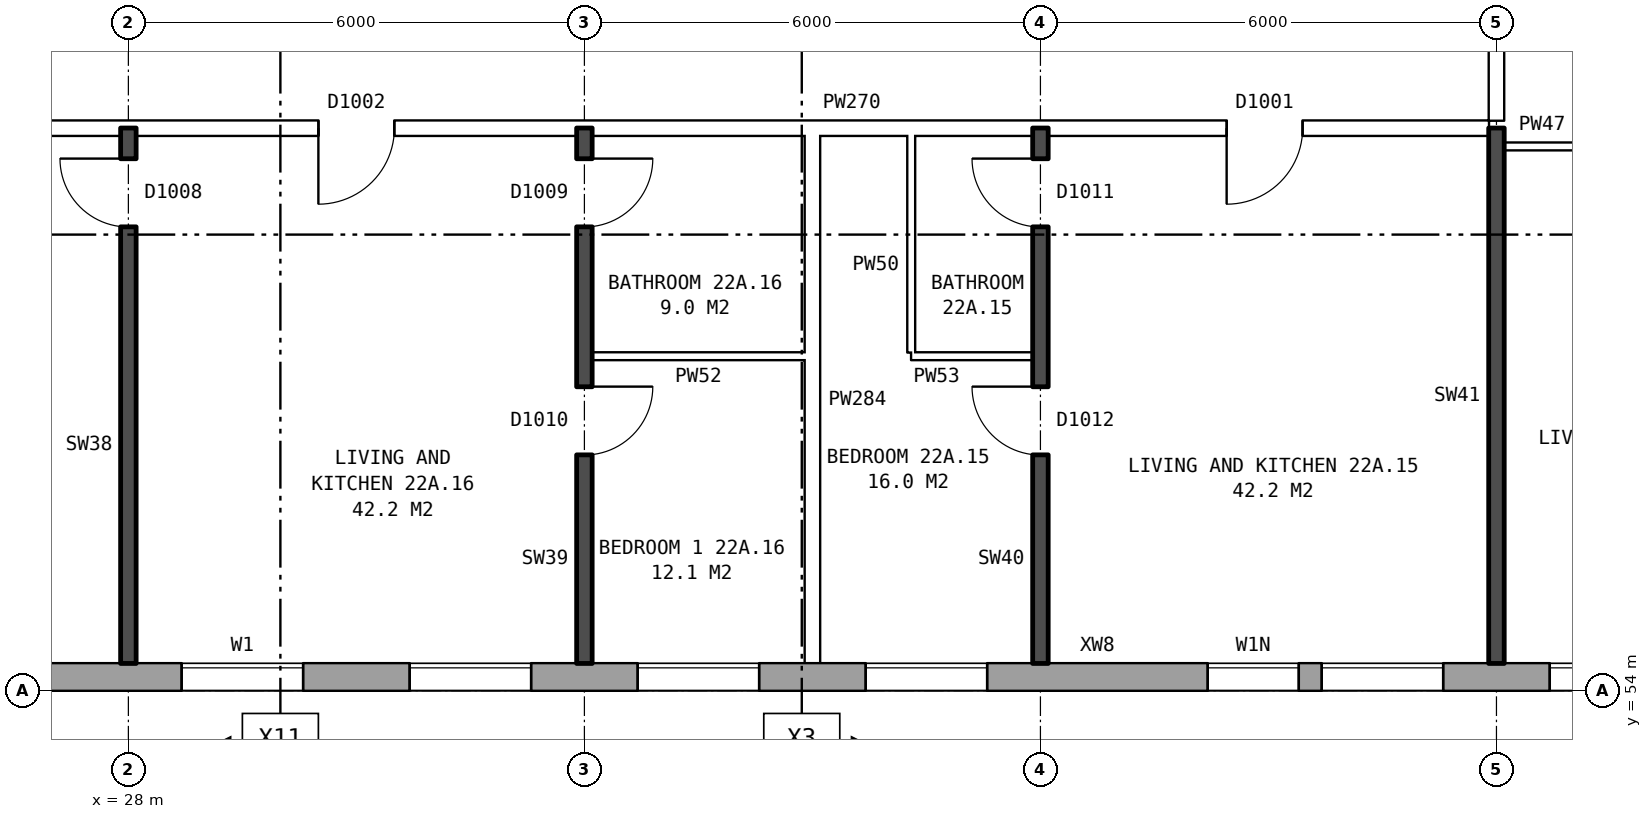
"""IFC4 building model, lengths in metres.
Left out: names, types, materials, properties, quantities, classifications, styles, units other than length and angle.
Written with IfcOpenShell. Run it as: python <this file> out.ifc"""

import sys

from ifc_helpers import new_model, si_unit, direction, frame, frame_2d, origin, place, context, subcontext, project, spatial, rectangle, extrude, element, fill, save


model = new_model("IFC4")
c1 = context("Model", 3, precision=1e-05, world=origin(), true_north=direction((0.0, 1.0)))
c2 = subcontext(c1, "Body", "Model", "MODEL_VIEW")
j1 = project(units=[si_unit("LENGTHUNIT", "METRE"), si_unit("PLANEANGLEUNIT", "RADIAN")], contexts=[c1])
p1 = place(None, origin())
s1 = spatial("IfcSite", under=j1, at=p1, CompositionType="ELEMENT")
p2 = place(p1, origin())
s2 = spatial("IfcBuilding", under=s1, at=p2, CompositionType="ELEMENT")
p3 = place(p2, frame((0.0, 0.0, 80.9)))
s3 = spatial("IfcBuildingStorey", under=s2, at=p3, CompositionType="ELEMENT", Elevation=80.9)
p4 = place(p3, frame((26.325, 54.18, 0.0), z_axis=(0.0, 0.0, 1.0), x_axis=(1.0, 0.0, 0.0)))
e1 = element("IfcWall", 1, at=p4, inside=s3, PredefinedType="STANDARD", context=c2, shape_type="SweptSolid", body=[
    extrude(rectangle(XDim=46.601, YDim=0.36, at=frame_2d((23.3, 0.0))), origin(), (0.0, 0.0, 1.0), 2.85),
])
p5 = place(p4, frame((2.375, 0.0, 0.8)))
e2 = element("IfcOpeningElement", 2, at=p5, cuts=e1, PredefinedType="OPENING", context=c2, shape_type="SweptSolid", body=[
    extrude(rectangle(XDim=1.6, YDim=1.8, at=frame_2d((0.8, 0.9))), frame((0.0, 0.19, 0.0), z_axis=(0.0, -1.0, 0.0), x_axis=(1.0, 0.0, 0.0)), (0.0, 0.0, 1.0), 0.38),
])
p6 = place(p4, frame((5.375, 0.0, 0.8)))
e3 = element("IfcOpeningElement", 3, at=p6, cuts=e1, PredefinedType="OPENING", context=c2, shape_type="SweptSolid", body=[
    extrude(rectangle(XDim=1.6, YDim=1.8, at=frame_2d((0.8, 0.9))), frame((0.0, 0.19, 0.0), z_axis=(0.0, -1.0, 0.0), x_axis=(1.0, 0.0, 0.0)), (0.0, 0.0, 1.0), 0.38),
])
p7 = place(p4, frame((8.375, 0.0, 0.8)))
e4 = element("IfcOpeningElement", 4, at=p7, cuts=e1, PredefinedType="OPENING", context=c2, shape_type="SweptSolid", body=[
    extrude(rectangle(XDim=1.6, YDim=1.8, at=frame_2d((0.8, 0.9))), frame((0.0, 0.19, 0.0), z_axis=(0.0, -1.0, 0.0), x_axis=(1.0, 0.0, 0.0)), (0.0, 0.0, 1.0), 0.38),
])
p8 = place(p4, frame((11.375, 0.0, 0.8)))
e5 = element("IfcOpeningElement", 5, at=p8, cuts=e1, PredefinedType="OPENING", context=c2, shape_type="SweptSolid", body=[
    extrude(rectangle(XDim=1.6, YDim=1.8, at=frame_2d((0.8, 0.9))), frame((0.0, 0.19, 0.0), z_axis=(0.0, -1.0, 0.0), x_axis=(1.0, 0.0, 0.0)), (0.0, 0.0, 1.0), 0.38),
])
p9 = place(p4, frame((15.875, 0.0, 0.8)))
e6 = element("IfcOpeningElement", 6, at=p9, cuts=e1, PredefinedType="OPENING", context=c2, shape_type="SweptSolid", body=[
    extrude(rectangle(XDim=1.2, YDim=1.2, at=frame_2d((0.6, 0.6))), frame((0.0, 0.19, 0.0), z_axis=(0.0, -1.0, 0.0), x_axis=(1.0, 0.0, 0.0)), (0.0, 0.0, 1.0), 0.38),
])
p10 = place(p4, frame((17.375, 0.0, 0.8)))
e7 = element("IfcOpeningElement", 7, at=p10, cuts=e1, PredefinedType="OPENING", context=c2, shape_type="SweptSolid", body=[
    extrude(rectangle(XDim=1.6, YDim=1.8, at=frame_2d((0.8, 0.9))), frame((0.0, 0.19, 0.0), z_axis=(0.0, -1.0, 0.0), x_axis=(1.0, 0.0, 0.0)), (0.0, 0.0, 1.0), 0.38),
])
p11 = place(p4, frame((20.375, 0.0, 0.8)))
e8 = element("IfcOpeningElement", 8, at=p11, cuts=e1, PredefinedType="OPENING", context=c2, shape_type="SweptSolid", body=[
    extrude(rectangle(XDim=1.6, YDim=1.8, at=frame_2d((0.8, 0.9))), frame((0.0, 0.19, 0.0), z_axis=(0.0, -1.0, 0.0), x_axis=(1.0, 0.0, 0.0)), (0.0, 0.0, 1.0), 0.38),
])
p12 = place(p4, frame((23.375, 0.0, 0.8)))
e9 = element("IfcOpeningElement", 9, at=p12, cuts=e1, PredefinedType="OPENING", context=c2, shape_type="SweptSolid", body=[
    extrude(rectangle(XDim=1.6, YDim=1.8, at=frame_2d((0.8, 0.9))), frame((0.0, 0.19, 0.0), z_axis=(0.0, -1.0, 0.0), x_axis=(1.0, 0.0, 0.0)), (0.0, 0.0, 1.0), 0.38),
])
p13 = place(p4, frame((26.375, 0.0, 0.8)))
e10 = element("IfcOpeningElement", 10, at=p13, cuts=e1, PredefinedType="OPENING", context=c2, shape_type="SweptSolid", body=[
    extrude(rectangle(XDim=1.6, YDim=1.8, at=frame_2d((0.8, 0.9))), frame((0.0, 0.19, 0.0), z_axis=(0.0, -1.0, 0.0), x_axis=(1.0, 0.0, 0.0)), (0.0, 0.0, 1.0), 0.38),
])
p14 = place(p4, frame((28.825, 0.0, 0.8)))
e11 = element("IfcOpeningElement", 11, at=p14, cuts=e1, PredefinedType="OPENING", context=c2, shape_type="SweptSolid", body=[
    extrude(rectangle(XDim=1.2, YDim=1.8, at=frame_2d((0.6, 0.9))), frame((0.0, 0.19, 0.0), z_axis=(0.0, -1.0, 0.0), x_axis=(1.0, 0.0, 0.0)), (0.0, 0.0, 1.0), 0.38),
])
p15 = place(p4, frame((32.375, 0.0, 1.7)))
e12 = element("IfcOpeningElement", 12, at=p15, cuts=e1, PredefinedType="OPENING", context=c2, shape_type="SweptSolid", body=[
    extrude(rectangle(XDim=0.8, YDim=0.9, at=frame_2d((0.4, 0.45))), frame((0.0, 0.19, 0.0), z_axis=(0.0, -1.0, 0.0), x_axis=(1.0, 0.0, 0.0)), (0.0, 0.0, 1.0), 0.38),
])
p16 = place(p4, frame((35.375, 0.0, 0.8)))
e13 = element("IfcOpeningElement", 13, at=p16, cuts=e1, PredefinedType="OPENING", context=c2, shape_type="SweptSolid", body=[
    extrude(rectangle(XDim=1.6, YDim=1.8, at=frame_2d((0.8, 0.9))), frame((0.0, 0.19, 0.0), z_axis=(0.0, -1.0, 0.0), x_axis=(1.0, 0.0, 0.0)), (0.0, 0.0, 1.0), 0.38),
])
p17 = place(p4, frame((38.375, 0.0, 0.8)))
e14 = element("IfcOpeningElement", 14, at=p17, cuts=e1, PredefinedType="OPENING", context=c2, shape_type="SweptSolid", body=[
    extrude(rectangle(XDim=1.6, YDim=1.8, at=frame_2d((0.8, 0.9))), frame((0.0, 0.19, 0.0), z_axis=(0.0, -1.0, 0.0), x_axis=(1.0, 0.0, 0.0)), (0.0, 0.0, 1.0), 0.38),
])
p18 = place(p4, frame((41.375, 0.0, 0.8)))
e15 = element("IfcOpeningElement", 15, at=p18, cuts=e1, PredefinedType="OPENING", context=c2, shape_type="SweptSolid", body=[
    extrude(rectangle(XDim=1.6, YDim=1.8, at=frame_2d((0.8, 0.9))), frame((0.0, 0.19, 0.0), z_axis=(0.0, -1.0, 0.0), x_axis=(1.0, 0.0, 0.0)), (0.0, 0.0, 1.0), 0.38),
])
p19 = place(p4, frame((44.375, 0.0, 0.8)))
e16 = element("IfcOpeningElement", 16, at=p19, cuts=e1, PredefinedType="OPENING", context=c2, shape_type="SweptSolid", body=[
    extrude(rectangle(XDim=1.6, YDim=1.8, at=frame_2d((0.8, 0.9))), frame((0.0, 0.19, 0.0), z_axis=(0.0, -1.0, 0.0), x_axis=(1.0, 0.0, 0.0)), (0.0, 0.0, 1.0), 0.38),
])
p20 = place(p4, frame((30.325, 0.0, 0.8)))
e17 = element("IfcOpeningElement", 17, at=p20, cuts=e1, PredefinedType="OPENING", context=c2, shape_type="SweptSolid", body=[
    extrude(rectangle(XDim=0.6, YDim=0.9, at=frame_2d((0.3, 0.45))), frame((0.0, 0.19, 0.0), z_axis=(0.0, -1.0, 0.0), x_axis=(1.0, 0.0, 0.0)), (0.0, 0.0, 1.0), 0.38),
])
p21 = place(p4, frame((33.475, 0.0, 0.8)))
e18 = element("IfcOpeningElement", 18, at=p21, cuts=e1, PredefinedType="OPENING", context=c2, shape_type="SweptSolid", body=[
    extrude(rectangle(XDim=1.0, YDim=1.8, at=frame_2d((0.5, 0.9))), frame((0.0, 0.19, 0.0), z_axis=(0.0, -1.0, 0.0), x_axis=(1.0, 0.0, 0.0)), (0.0, 0.0, 1.0), 0.38),
])
p22 = place(p3, frame((34.1, 58.4, 0.0), z_axis=(0.0, 0.0, 1.0), x_axis=(1.0, 0.0, 0.0)))
e19 = element("IfcWall", 19, at=p22, inside=s3, PredefinedType="PARTITIONING", context=c2, shape_type="SweptSolid", body=[
    extrude(rectangle(XDim=2.8, YDim=0.1, at=frame_2d((1.4, 0.0))), origin(), (0.0, 0.0, 1.0), 2.85),
])
p23 = place(p3, frame((38.3, 58.4, 0.0), z_axis=(0.0, 0.0, 1.0), x_axis=(1.0, 0.0, 0.0)))
e20 = element("IfcWall", 20, at=p23, inside=s3, PredefinedType="PARTITIONING", context=c2, shape_type="SweptSolid", body=[
    extrude(rectangle(XDim=1.6, YDim=0.1, at=frame_2d((0.8, 0.0))), origin(), (0.0, 0.0, 1.0), 2.85),
])
p24 = place(p3, frame((46.1, 61.16, 0.0), z_axis=(0.0, 0.0, 1.0), x_axis=(1.0, 0.0, 0.0)))
e21 = element("IfcWall", 21, at=p24, inside=s3, PredefinedType="PARTITIONING", context=c2, shape_type="SweptSolid", body=[
    extrude(rectangle(XDim=2.9, YDim=0.1, at=frame_2d((1.45, 0.0))), origin(), (0.0, 0.0, 1.0), 2.85),
])
p25 = place(p24, frame((1.0, 0.0, 0.0)))
e22 = element("IfcOpeningElement", 22, at=p25, cuts=e21, PredefinedType="OPENING", context=c2, shape_type="SweptSolid", body=[
    extrude(rectangle(XDim=0.9, YDim=2.1, at=frame_2d((0.45, 1.05))), frame((0.0, 0.06, 0.0), z_axis=(0.0, -1.0, 0.0), x_axis=(1.0, 0.0, 0.0)), (0.0, 0.0, 1.0), 0.12),
])
p26 = place(p3, frame((23.61, 61.4, 0.0), z_axis=(0.0, 0.0, 1.0), x_axis=(1.0, 0.0, 0.0)))
e23 = element("IfcWall", 23, at=p26, inside=s3, PredefinedType="PARTITIONING", context=c2, shape_type="SweptSolid", body=[
    extrude(rectangle(XDim=22.29, YDim=0.2, at=frame_2d((11.145, 0.0))), origin(), (0.0, 0.0, 1.0), 2.85),
])
p27 = place(p26, frame((18.84, 0.0, 0.0)))
e24 = element("IfcOpeningElement", 24, at=p27, cuts=e23, PredefinedType="OPENING", context=c2, shape_type="SweptSolid", body=[
    extrude(rectangle(XDim=1.0, YDim=2.1, at=frame_2d((0.5, 1.05))), frame((0.0, 0.11, 0.0), z_axis=(0.0, -1.0, 0.0), x_axis=(1.0, 0.0, 0.0)), (0.0, 0.0, 1.0), 0.22),
])
p28 = place(p26, frame((6.89, 0.0, 0.0)))
e25 = element("IfcOpeningElement", 25, at=p28, cuts=e23, PredefinedType="OPENING", context=c2, shape_type="SweptSolid", body=[
    extrude(rectangle(XDim=1.0, YDim=2.1, at=frame_2d((0.5, 1.05))), frame((0.0, 0.11, 0.0), z_axis=(0.0, -1.0, 0.0), x_axis=(1.0, 0.0, 0.0)), (0.0, 0.0, 1.0), 0.22),
])
p29 = place(p3, frame((28.0, 54.36, 0.0), z_axis=(0.0, 0.0, 1.0), x_axis=(0.0, 1.0, 0.0)))
e26 = element("IfcWall", 26, at=p29, inside=s3, PredefinedType="SOLIDWALL", context=c2, shape_type="SweptSolid", body=[
    extrude(rectangle(XDim=7.04, YDim=0.2, at=frame_2d((3.52, 0.0))), origin(), (0.0, 0.0, 1.0), 2.85),
])
p30 = place(p29, frame((5.74, 0.0, 0.0)))
e27 = element("IfcOpeningElement", 27, at=p30, cuts=e26, PredefinedType="OPENING", context=c2, shape_type="SweptSolid", body=[
    extrude(rectangle(XDim=0.9, YDim=2.1, at=frame_2d((0.45, 1.05))), frame((0.0, 0.11, 0.0), z_axis=(0.0, -1.0, 0.0), x_axis=(1.0, 0.0, 0.0)), (0.0, 0.0, 1.0), 0.22),
])
p31 = place(p3, frame((34.0, 54.36, 0.0), z_axis=(0.0, 0.0, 1.0), x_axis=(0.0, 1.0, 0.0)))
e28 = element("IfcWall", 28, at=p31, inside=s3, PredefinedType="SOLIDWALL", context=c2, shape_type="SweptSolid", body=[
    extrude(rectangle(XDim=7.04, YDim=0.2, at=frame_2d((3.52, 0.0))), origin(), (0.0, 0.0, 1.0), 2.85),
])
p32 = place(p31, frame((2.74, 0.0, 0.0)))
e29 = element("IfcOpeningElement", 29, at=p32, cuts=e28, PredefinedType="OPENING", context=c2, shape_type="SweptSolid", body=[
    extrude(rectangle(XDim=0.9, YDim=2.1, at=frame_2d((0.45, 1.05))), frame((0.0, 0.11, 0.0), z_axis=(0.0, -1.0, 0.0), x_axis=(1.0, 0.0, 0.0)), (0.0, 0.0, 1.0), 0.22),
])
p33 = place(p31, frame((5.74, 0.0, 0.0)))
e30 = element("IfcOpeningElement", 30, at=p33, cuts=e28, PredefinedType="OPENING", context=c2, shape_type="SweptSolid", body=[
    extrude(rectangle(XDim=0.9, YDim=2.1, at=frame_2d((0.45, 1.05))), frame((0.0, 0.11, 0.0), z_axis=(0.0, -1.0, 0.0), x_axis=(1.0, 0.0, 0.0)), (0.0, 0.0, 1.0), 0.22),
])
p34 = place(p3, frame((37.0, 54.36, 0.0), z_axis=(0.0, 0.0, 1.0), x_axis=(0.0, 1.0, 0.0)))
e31 = element("IfcWall", 31, at=p34, inside=s3, PredefinedType="PARTITIONING", context=c2, shape_type="SweptSolid", body=[
    extrude(rectangle(XDim=6.94, YDim=0.2, at=frame_2d((3.47, 0.0))), origin(), (0.0, 0.0, 1.0), 2.85),
])
p35 = place(p3, frame((38.3, 58.45, 0.0), z_axis=(0.0, 0.0, 1.0), x_axis=(0.0, 1.0, 0.0)))
e32 = element("IfcWall", 32, at=p35, inside=s3, PredefinedType="PARTITIONING", context=c2, shape_type="SweptSolid", body=[
    extrude(rectangle(XDim=2.85, YDim=0.1, at=frame_2d((1.425, 0.0))), origin(), (0.0, 0.0, 1.0), 2.85),
])
p36 = place(p3, frame((40.0, 54.36, 0.0), z_axis=(0.0, 0.0, 1.0), x_axis=(0.0, 1.0, 0.0)))
e33 = element("IfcWall", 33, at=p36, inside=s3, PredefinedType="SOLIDWALL", context=c2, shape_type="SweptSolid", body=[
    extrude(rectangle(XDim=7.04, YDim=0.2, at=frame_2d((3.52, 0.0))), origin(), (0.0, 0.0, 1.0), 2.85),
])
p37 = place(p36, frame((2.74, 0.0, 0.0)))
e34 = element("IfcOpeningElement", 34, at=p37, cuts=e33, PredefinedType="OPENING", context=c2, shape_type="SweptSolid", body=[
    extrude(rectangle(XDim=0.9, YDim=2.1, at=frame_2d((0.45, 1.05))), frame((0.0, 0.11, 0.0), z_axis=(0.0, -1.0, 0.0), x_axis=(1.0, 0.0, 0.0)), (0.0, 0.0, 1.0), 0.22),
])
p38 = place(p36, frame((5.74, 0.0, 0.0)))
e35 = element("IfcOpeningElement", 35, at=p38, cuts=e33, PredefinedType="OPENING", context=c2, shape_type="SweptSolid", body=[
    extrude(rectangle(XDim=0.9, YDim=2.1, at=frame_2d((0.45, 1.05))), frame((0.0, 0.11, 0.0), z_axis=(0.0, -1.0, 0.0), x_axis=(1.0, 0.0, 0.0)), (0.0, 0.0, 1.0), 0.22),
])
p39 = place(p3, frame((46.0, 54.36, 0.0), z_axis=(0.0, 0.0, 1.0), x_axis=(0.0, 1.0, 0.0)))
e36 = element("IfcWall", 36, at=p39, inside=s3, PredefinedType="SOLIDWALL", context=c2, shape_type="SweptSolid", body=[
    extrude(rectangle(XDim=7.04, YDim=0.2, at=frame_2d((3.52, 0.0))), origin(), (0.0, 0.0, 1.0), 2.85),
])
p40 = place(p3, frame((46.0, 61.5, 0.0), z_axis=(0.0, 0.0, 1.0), x_axis=(0.0, 1.0, 0.0)))
e37 = element("IfcWall", 37, at=p40, inside=s3, PredefinedType="PARTITIONING", context=c2, shape_type="SweptSolid", body=[
    extrude(rectangle(XDim=2.2, YDim=0.2, at=frame_2d((1.1, 0.0))), origin(), (0.0, 0.0, 1.0), 2.85),
])
p41 = place(p5, origin())
e38 = element("IfcWindow", 38, at=p41, inside=s3, PartitioningType="SINGLE_PANEL", PredefinedType="WINDOW", context=c2, shape_type="SweptSolid", body=[
    extrude(rectangle(XDim=1.6, YDim=1.8, at=frame_2d((0.8, 0.9))), frame((0.0, 0.15, 0.0), z_axis=(0.0, -1.0, 0.0), x_axis=(1.0, 0.0, 0.0)), (0.0, 0.0, 1.0), 0.06),
])
fill(e2, e38)
p42 = place(p6, origin())
e39 = element("IfcWindow", 39, at=p42, inside=s3, PartitioningType="SINGLE_PANEL", PredefinedType="WINDOW", context=c2, shape_type="SweptSolid", body=[
    extrude(rectangle(XDim=1.6, YDim=1.8, at=frame_2d((0.8, 0.9))), frame((0.0, 0.15, 0.0), z_axis=(0.0, -1.0, 0.0), x_axis=(1.0, 0.0, 0.0)), (0.0, 0.0, 1.0), 0.06),
])
fill(e3, e39)
p43 = place(p7, origin())
e40 = element("IfcWindow", 40, at=p43, inside=s3, PartitioningType="SINGLE_PANEL", PredefinedType="WINDOW", context=c2, shape_type="SweptSolid", body=[
    extrude(rectangle(XDim=1.6, YDim=1.8, at=frame_2d((0.8, 0.9))), frame((0.0, 0.15, 0.0), z_axis=(0.0, -1.0, 0.0), x_axis=(1.0, 0.0, 0.0)), (0.0, 0.0, 1.0), 0.06),
])
fill(e4, e40)
p44 = place(p8, origin())
e41 = element("IfcWindow", 41, at=p44, inside=s3, PartitioningType="SINGLE_PANEL", PredefinedType="WINDOW", context=c2, shape_type="SweptSolid", body=[
    extrude(rectangle(XDim=1.6, YDim=1.8, at=frame_2d((0.8, 0.9))), frame((0.0, 0.15, 0.0), z_axis=(0.0, -1.0, 0.0), x_axis=(1.0, 0.0, 0.0)), (0.0, 0.0, 1.0), 0.06),
])
fill(e5, e41)
p45 = place(p9, origin())
e42 = element("IfcWindow", 42, at=p45, inside=s3, PartitioningType="SINGLE_PANEL", PredefinedType="WINDOW", context=c2, shape_type="SweptSolid", body=[
    extrude(rectangle(XDim=1.2, YDim=1.2, at=frame_2d((0.6, 0.6))), frame((0.0, 0.15, 0.0), z_axis=(0.0, -1.0, 0.0), x_axis=(1.0, 0.0, 0.0)), (0.0, 0.0, 1.0), 0.06),
])
fill(e6, e42)
p46 = place(p10, origin())
e43 = element("IfcWindow", 43, at=p46, inside=s3, PartitioningType="SINGLE_PANEL", PredefinedType="WINDOW", context=c2, shape_type="SweptSolid", body=[
    extrude(rectangle(XDim=1.6, YDim=1.8, at=frame_2d((0.8, 0.9))), frame((0.0, 0.15, 0.0), z_axis=(0.0, -1.0, 0.0), x_axis=(1.0, 0.0, 0.0)), (0.0, 0.0, 1.0), 0.06),
])
fill(e7, e43)
p47 = place(p11, origin())
e44 = element("IfcWindow", 44, at=p47, inside=s3, PartitioningType="SINGLE_PANEL", PredefinedType="WINDOW", context=c2, shape_type="SweptSolid", body=[
    extrude(rectangle(XDim=1.6, YDim=1.8, at=frame_2d((0.8, 0.9))), frame((0.0, 0.15, 0.0), z_axis=(0.0, -1.0, 0.0), x_axis=(1.0, 0.0, 0.0)), (0.0, 0.0, 1.0), 0.06),
])
fill(e8, e44)
p48 = place(p37, origin())
e45 = element("IfcDoor", 45, at=p48, inside=s3, OperationType="SINGLE_SWING_RIGHT", PredefinedType="DOOR", context=c2, shape_type="SweptSolid", body=[
    extrude(rectangle(XDim=0.9, YDim=2.1, at=frame_2d((0.45, 1.05))), frame((0.0, 0.025, 0.0), z_axis=(0.0, -1.0, 0.0), x_axis=(1.0, 0.0, 0.0)), (0.0, 0.0, 1.0), 0.05),
])
fill(e34, e45)
p49 = place(p27, frame((1.0, 0.0, 0.0), z_axis=(0.0, 0.0, 1.0), x_axis=(-1.0, 0.0, 0.0)))
e46 = element("IfcDoor", 46, at=p49, inside=s3, OperationType="SINGLE_SWING_RIGHT", PredefinedType="DOOR", context=c2, shape_type="SweptSolid", body=[
    extrude(rectangle(XDim=1.0, YDim=2.1, at=frame_2d((0.5, 1.05))), frame((0.0, 0.025, 0.0), z_axis=(0.0, -1.0, 0.0), x_axis=(1.0, 0.0, 0.0)), (0.0, 0.0, 1.0), 0.05),
])
fill(e24, e46)
p50 = place(p38, origin())
e47 = element("IfcDoor", 47, at=p50, inside=s3, OperationType="SINGLE_SWING_RIGHT", PredefinedType="DOOR", context=c2, shape_type="SweptSolid", body=[
    extrude(rectangle(XDim=0.9, YDim=2.1, at=frame_2d((0.45, 1.05))), frame((0.0, 0.025, 0.0), z_axis=(0.0, -1.0, 0.0), x_axis=(1.0, 0.0, 0.0)), (0.0, 0.0, 1.0), 0.05),
])
fill(e35, e47)
p51 = place(p32, frame((0.9, 0.0, 0.0), z_axis=(0.0, 0.0, 1.0), x_axis=(-1.0, 0.0, 0.0)))
e48 = element("IfcDoor", 48, at=p51, inside=s3, OperationType="SINGLE_SWING_LEFT", PredefinedType="DOOR", context=c2, shape_type="SweptSolid", body=[
    extrude(rectangle(XDim=0.9, YDim=2.1, at=frame_2d((0.45, 1.05))), frame((0.0, 0.025, 0.0), z_axis=(0.0, -1.0, 0.0), x_axis=(1.0, 0.0, 0.0)), (0.0, 0.0, 1.0), 0.05),
])
fill(e29, e48)
p52 = place(p30, origin())
e49 = element("IfcDoor", 49, at=p52, inside=s3, OperationType="SINGLE_SWING_RIGHT", PredefinedType="DOOR", context=c2, shape_type="SweptSolid", body=[
    extrude(rectangle(XDim=0.9, YDim=2.1, at=frame_2d((0.45, 1.05))), frame((0.0, 0.025, 0.0), z_axis=(0.0, -1.0, 0.0), x_axis=(1.0, 0.0, 0.0)), (0.0, 0.0, 1.0), 0.05),
])
fill(e27, e49)
p53 = place(p28, frame((1.0, 0.0, 0.0), z_axis=(0.0, 0.0, 1.0), x_axis=(-1.0, 0.0, 0.0)))
e50 = element("IfcDoor", 50, at=p53, inside=s3, OperationType="SINGLE_SWING_RIGHT", PredefinedType="DOOR", context=c2, shape_type="SweptSolid", body=[
    extrude(rectangle(XDim=1.0, YDim=2.1, at=frame_2d((0.5, 1.05))), frame((0.0, 0.025, 0.0), z_axis=(0.0, -1.0, 0.0), x_axis=(1.0, 0.0, 0.0)), (0.0, 0.0, 1.0), 0.05),
])
fill(e25, e50)
p54 = place(p33, frame((0.9, 0.0, 0.0), z_axis=(0.0, 0.0, 1.0), x_axis=(-1.0, 0.0, 0.0)))
e51 = element("IfcDoor", 51, at=p54, inside=s3, OperationType="SINGLE_SWING_LEFT", PredefinedType="DOOR", context=c2, shape_type="SweptSolid", body=[
    extrude(rectangle(XDim=0.9, YDim=2.1, at=frame_2d((0.45, 1.05))), frame((0.0, 0.025, 0.0), z_axis=(0.0, -1.0, 0.0), x_axis=(1.0, 0.0, 0.0)), (0.0, 0.0, 1.0), 0.05),
])
fill(e30, e51)
save(model, sys.argv[1])
